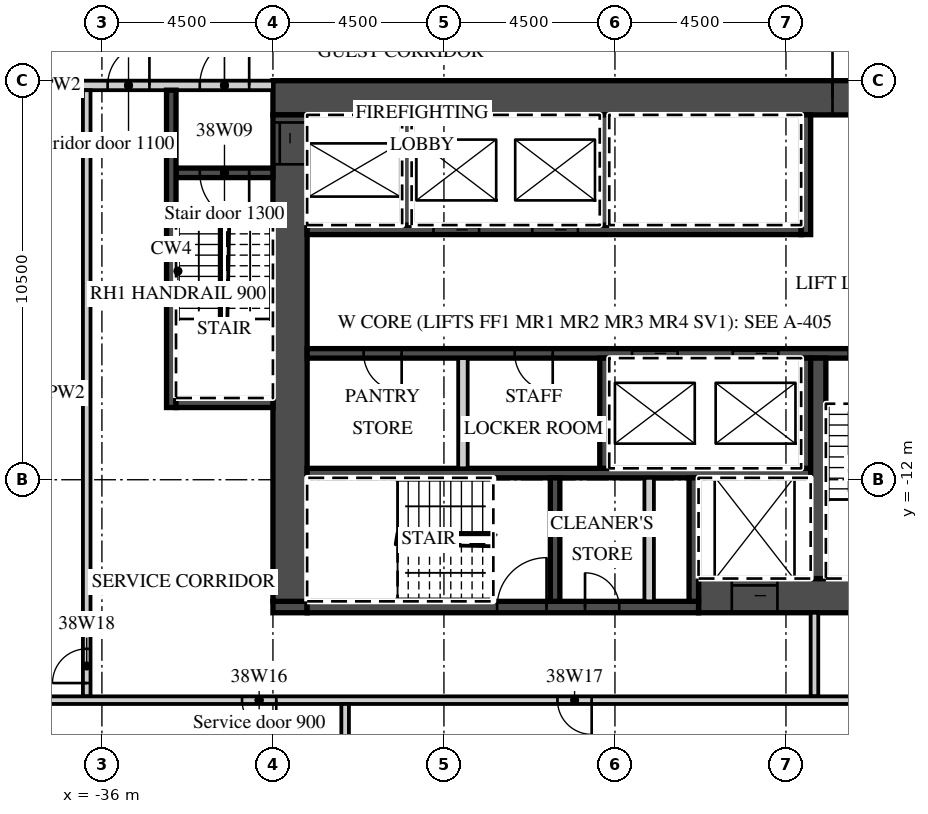
"""IFC4 building model, lengths in metres.
Left out: names, types, materials, properties, quantities, classifications, styles, units other than length and angle.
Written with IfcOpenShell. Run it as: python <this file> out.ifc"""

import sys

from ifc_helpers import new_model, si_unit, direction, frame, frame_2d, origin, place, context, subcontext, project, spatial, rectangle, extrude, element, fill, save


model = new_model("IFC4")
c1 = context("Model", 3, precision=1e-05, world=origin(), true_north=direction((0.0, 1.0)))
c2 = subcontext(c1, "Body", "Model", "MODEL_VIEW")
j1 = project(units=[si_unit("LENGTHUNIT", "METRE"), si_unit("PLANEANGLEUNIT", "RADIAN")], contexts=[c1])
p1 = place(None, origin())
s1 = spatial("IfcSite", under=j1, at=p1, CompositionType="ELEMENT")
p2 = place(p1, origin())
s2 = spatial("IfcBuilding", under=s1, at=p2, CompositionType="ELEMENT")
p3 = place(p2, frame((0.0, 0.0, 166.9)))
s3 = spatial("IfcBuildingStorey", under=s2, at=p3, CompositionType="ELEMENT", Elevation=166.9)
p4 = place(p3, frame((-31.5, -1.95, 0.0), z_axis=(0.0, 0.0, 1.0), x_axis=(1.0, 0.0, 0.0)))
e1 = element("IfcWall", 1, at=p4, inside=s3, PredefinedType="SHEAR", context=c2, shape_type="SweptSolid", body=[
    extrude(rectangle(XDim=18.0, YDim=0.9, at=frame_2d((9.0, 0.0))), origin(), (0.0, 0.0, 1.0), 3.02),
])
p5 = place(p4, frame((14.725, 0.0, 0.0)))
e2 = element("IfcOpeningElement", 2, at=p5, cuts=e1, PredefinedType="OPENING", context=c2, shape_type="SweptSolid", body=[
    extrude(rectangle(XDim=1.8, YDim=2.1, at=frame_2d((0.9, 1.05))), frame((0.0, 0.46, 0.0), z_axis=(0.0, -1.0, 0.0), x_axis=(1.0, 0.0, 0.0)), (0.0, 0.0, 1.0), 0.92),
])
p6 = place(p3, frame((-20.3, -15.05, 0.0), z_axis=(0.0, 0.0, 1.0), x_axis=(1.0, 0.0, 0.0)))
e3 = element("IfcWall", 3, at=p6, inside=s3, PredefinedType="SHEAR", context=c2, shape_type="SweptSolid", body=[
    extrude(rectangle(XDim=6.8, YDim=0.9, at=frame_2d((3.4, 0.0))), origin(), (0.0, 0.0, 1.0), 3.02),
])
p7 = place(p6, frame((0.875, 0.0, 0.0)))
e4 = element("IfcOpeningElement", 4, at=p7, cuts=e3, PredefinedType="OPENING", context=c2, shape_type="SweptSolid", body=[
    extrude(rectangle(XDim=1.2, YDim=2.1, at=frame_2d((0.6, 1.05))), frame((0.0, 0.46, 0.0), z_axis=(0.0, -1.0, 0.0), x_axis=(1.0, 0.0, 0.0)), (0.0, 0.0, 1.0), 0.92),
])
p8 = place(p3, frame((-31.5, -15.35, 0.0), z_axis=(0.0, 0.0, 1.0), x_axis=(1.0, 0.0, 0.0)))
e5 = element("IfcWall", 5, at=p8, inside=s3, PredefinedType="SHEAR", context=c2, shape_type="SweptSolid", body=[
    extrude(rectangle(XDim=0.9, YDim=0.3, at=frame_2d((0.45, 0.0))), origin(), (0.0, 0.0, 1.0), 3.02),
])
p9 = place(p3, frame((-30.6, -15.35, 0.0), z_axis=(0.0, 0.0, 1.0), x_axis=(1.0, 0.0, 0.0)))
e6 = element("IfcWall", 6, at=p9, inside=s3, PredefinedType="SHEAR", context=c2, shape_type="SweptSolid", body=[
    extrude(rectangle(XDim=10.3, YDim=0.3, at=frame_2d((5.15, 0.0))), origin(), (0.0, 0.0, 1.0), 3.02),
])
p10 = place(p9, frame((5.0, 0.0, 0.0)))
e7 = element("IfcOpeningElement", 7, at=p10, cuts=e6, PredefinedType="OPENING", context=c2, shape_type="SweptSolid", body=[
    extrude(rectangle(XDim=1.3, YDim=2.1, at=frame_2d((0.65, 1.05))), frame((0.0, 0.16, 0.0), z_axis=(0.0, -1.0, 0.0), x_axis=(1.0, 0.0, 0.0)), (0.0, 0.0, 1.0), 0.32),
])
p11 = place(p9, frame((7.312, 0.0, 0.0)))
e8 = element("IfcOpeningElement", 8, at=p11, cuts=e6, PredefinedType="OPENING", context=c2, shape_type="SweptSolid", body=[
    extrude(rectangle(XDim=0.9, YDim=2.1, at=frame_2d((0.45, 1.05))), frame((0.0, 0.16, 0.0), z_axis=(0.0, -1.0, 0.0), x_axis=(1.0, 0.0, 0.0)), (0.0, 0.0, 1.0), 0.32),
])
p12 = place(p3, frame((-31.05, -15.2, 0.0), z_axis=(0.0, 0.0, 1.0), x_axis=(0.0, 1.0, 0.0)))
e9 = element("IfcWall", 9, at=p12, inside=s3, PredefinedType="SHEAR", context=c2, shape_type="SweptSolid", body=[
    extrude(rectangle(XDim=12.8, YDim=0.9, at=frame_2d((6.4, 0.0))), origin(), (0.0, 0.0, 1.0), 3.02),
])
p13 = place(p12, frame((11.5, 0.0, 0.0)))
e10 = element("IfcOpeningElement", 10, at=p13, cuts=e9, PredefinedType="OPENING", context=c2, shape_type="SweptSolid", body=[
    extrude(rectangle(XDim=1.1, YDim=2.1, at=frame_2d((0.55, 1.05))), frame((0.0, 0.46, 0.0), z_axis=(0.0, -1.0, 0.0), x_axis=(1.0, 0.0, 0.0)), (0.0, 0.0, 1.0), 0.92),
])
p14 = place(p3, frame((-30.6, -5.425, 0.0), z_axis=(0.0, 0.0, 1.0), x_axis=(1.0, 0.0, 0.0)))
e11 = element("IfcWall", 11, at=p14, inside=s3, PredefinedType="SHEAR", context=c2, shape_type="SweptSolid", body=[
    extrude(rectangle(XDim=13.0, YDim=0.25, at=frame_2d((6.5, 0.0))), origin(), (0.0, 0.0, 1.0), 3.02),
])
p15 = place(p14, frame((3.325, 0.0, 0.0)))
e12 = element("IfcOpeningElement", 12, at=p15, cuts=e11, PredefinedType="OPENING", context=c2, shape_type="SweptSolid", body=[
    extrude(rectangle(XDim=1.2, YDim=2.1, at=frame_2d((0.6, 1.05))), frame((0.0, 0.135, 0.0), z_axis=(0.0, -1.0, 0.0), x_axis=(1.0, 0.0, 0.0)), (0.0, 0.0, 1.0), 0.27),
])
p16 = place(p14, frame((5.925, 0.0, 0.0)))
e13 = element("IfcOpeningElement", 13, at=p16, cuts=e11, PredefinedType="OPENING", context=c2, shape_type="SweptSolid", body=[
    extrude(rectangle(XDim=1.2, YDim=2.1, at=frame_2d((0.6, 1.05))), frame((0.0, 0.135, 0.0), z_axis=(0.0, -1.0, 0.0), x_axis=(1.0, 0.0, 0.0)), (0.0, 0.0, 1.0), 0.27),
])
p17 = place(p3, frame((-17.475, -5.55, 0.0), z_axis=(0.0, 0.0, 1.0), x_axis=(0.0, 1.0, 0.0)))
e14 = element("IfcWall", 14, at=p17, inside=s3, PredefinedType="SHEAR", context=c2, shape_type="SweptSolid", body=[
    extrude(rectangle(XDim=3.15, YDim=0.25, at=frame_2d((1.575, 0.0))), origin(), (0.0, 0.0, 1.0), 3.02),
])
for number, where, z_axis, x_axis in (
    (15, (-27.975, -5.3, 0.0), (0.0, 0.0, 1.0), (0.0, 1.0, 0.0)),
    (16, (-22.775, -5.3, 0.0), (0.0, 0.0, 1.0), (0.0, 1.0, 0.0)),
):
    element("IfcWall", number, at=place(p3, frame(where, z_axis=z_axis, x_axis=x_axis)), inside=s3, PredefinedType="SHEAR", context=c2, shape_type="SweptSolid", body=[
        extrude(rectangle(XDim=2.9, YDim=0.25, at=frame_2d((1.45, 0.0))), origin(), (0.0, 0.0, 1.0), 3.02),
    ])
p18 = place(p3, frame((-30.6, -8.675, 0.0), z_axis=(0.0, 0.0, 1.0), x_axis=(1.0, 0.0, 0.0)))
e17 = element("IfcWall", 17, at=p18, inside=s3, PredefinedType="SHEAR", context=c2, shape_type="SweptSolid", body=[
    extrude(rectangle(XDim=16.2, YDim=0.25, at=frame_2d((8.1, 0.0))), origin(), (0.0, 0.0, 1.0), 3.02),
])
p19 = place(p18, frame((8.55, 0.0, 0.0)))
e18 = element("IfcOpeningElement", 18, at=p19, cuts=e17, PredefinedType="OPENING", context=c2, shape_type="SweptSolid", body=[
    extrude(rectangle(XDim=1.2, YDim=2.1, at=frame_2d((0.6, 1.05))), frame((0.0, 0.135, 0.0), z_axis=(0.0, -1.0, 0.0), x_axis=(1.0, 0.0, 0.0)), (0.0, 0.0, 1.0), 0.27),
])
p20 = place(p18, frame((11.2, 0.0, 0.0)))
e19 = element("IfcOpeningElement", 19, at=p20, cuts=e17, PredefinedType="OPENING", context=c2, shape_type="SweptSolid", body=[
    extrude(rectangle(XDim=1.2, YDim=2.1, at=frame_2d((0.6, 1.05))), frame((0.0, 0.135, 0.0), z_axis=(0.0, -1.0, 0.0), x_axis=(1.0, 0.0, 0.0)), (0.0, 0.0, 1.0), 0.27),
])
p21 = place(p18, frame((14.25, 0.0, 0.0)))
e20 = element("IfcOpeningElement", 20, at=p21, cuts=e17, PredefinedType="OPENING", context=c2, shape_type="SweptSolid", body=[
    extrude(rectangle(XDim=1.3, YDim=2.1, at=frame_2d((0.65, 1.05))), frame((0.0, 0.135, 0.0), z_axis=(0.0, -1.0, 0.0), x_axis=(1.0, 0.0, 0.0)), (0.0, 0.0, 1.0), 0.27),
])
p22 = place(p18, frame((1.488, 0.0, 0.0)))
e21 = element("IfcOpeningElement", 21, at=p22, cuts=e17, PredefinedType="OPENING", context=c2, shape_type="SweptSolid", body=[
    extrude(rectangle(XDim=1.0, YDim=2.1, at=frame_2d((0.5, 1.05))), frame((0.0, 0.135, 0.0), z_axis=(0.0, -1.0, 0.0), x_axis=(1.0, 0.0, 0.0)), (0.0, 0.0, 1.0), 0.27),
])
p23 = place(p18, frame((5.462, 0.0, 0.0)))
e22 = element("IfcOpeningElement", 22, at=p23, cuts=e17, PredefinedType="OPENING", context=c2, shape_type="SweptSolid", body=[
    extrude(rectangle(XDim=1.0, YDim=2.1, at=frame_2d((0.5, 1.05))), frame((0.0, 0.135, 0.0), z_axis=(0.0, -1.0, 0.0), x_axis=(1.0, 0.0, 0.0)), (0.0, 0.0, 1.0), 0.27),
])
p24 = place(p3, frame((-30.6, -11.825, 0.0), z_axis=(0.0, 0.0, 1.0), x_axis=(1.0, 0.0, 0.0)))
e23 = element("IfcWall", 23, at=p24, inside=s3, PredefinedType="SHEAR", context=c2, shape_type="SweptSolid", body=[
    extrude(rectangle(XDim=13.25, YDim=0.25, at=frame_2d((6.625, 0.0))), origin(), (0.0, 0.0, 1.0), 3.02),
])
for number, where, z_axis, x_axis in (
    (24, (-17.475, -11.7, 0.0), (0.0, 0.0, 1.0), (0.0, 1.0, 0.0)),
    (25, (-22.775, -11.7, 0.0), (0.0, 0.0, 1.0), (0.0, 1.0, 0.0)),
):
    element("IfcWall", number, at=place(p3, frame(where, z_axis=z_axis, x_axis=x_axis)), inside=s3, PredefinedType="SHEAR", context=c2, shape_type="SweptSolid", body=[
        extrude(rectangle(XDim=2.9, YDim=0.25, at=frame_2d((1.45, 0.0))), origin(), (0.0, 0.0, 1.0), 3.02),
    ])
p25 = place(p3, frame((-26.5, -11.7, 0.0), z_axis=(0.0, 0.0, 1.0), x_axis=(0.0, 1.0, 0.0)))
e26 = element("IfcWall", 26, at=p25, inside=s3, PredefinedType="PARTITIONING", context=c2, shape_type="SweptSolid", body=[
    extrude(rectangle(XDim=2.9, YDim=0.25, at=frame_2d((1.45, 0.0))), origin(), (0.0, 0.0, 1.0), 3.02),
])
p26 = place(p3, frame((-17.15, -14.6, 0.0), z_axis=(0.0, 0.0, 1.0), x_axis=(0.0, 1.0, 0.0)))
e27 = element("IfcWall", 27, at=p26, inside=s3, PredefinedType="SHEAR", context=c2, shape_type="SweptSolid", body=[
    extrude(rectangle(XDim=5.8, YDim=0.4, at=frame_2d((2.9, 0.0))), origin(), (0.0, 0.0, 1.0), 3.02),
])
for number, where, z_axis, x_axis in (
    (28, (-20.425, -15.2, 0.0), (0.0, 0.0, 1.0), (0.0, 1.0, 0.0)),
    (29, (-24.075, -15.2, 0.0), (0.0, 0.0, 1.0), (0.0, 1.0, 0.0)),
):
    element("IfcWall", number, at=place(p3, frame(where, z_axis=z_axis, x_axis=x_axis)), inside=s3, PredefinedType="SHEAR", context=c2, shape_type="SweptSolid", body=[
        extrude(rectangle(XDim=3.25, YDim=0.25, at=frame_2d((1.625, 0.0))), origin(), (0.0, 0.0, 1.0), 3.02),
    ])
p27 = place(p3, frame((-21.6, -15.2, 0.0), z_axis=(0.0, 0.0, 1.0), x_axis=(0.0, 1.0, 0.0)))
e30 = element("IfcWall", 30, at=p27, inside=s3, PredefinedType="PARTITIONING", context=c2, shape_type="SweptSolid", body=[
    extrude(rectangle(XDim=3.25, YDim=0.25, at=frame_2d((1.625, 0.0))), origin(), (0.0, 0.0, 1.0), 3.02),
])
p28 = place(p3, frame((-42.632, -1.625, 0.0), z_axis=(0.0, 0.0, 1.0), x_axis=(1.0, 0.0, 0.0)))
e31 = element("IfcWall", 31, at=p28, inside=s3, PredefinedType="PARTITIONING", context=c2, shape_type="SweptSolid", body=[
    extrude(rectangle(XDim=11.132, YDim=0.25, at=frame_2d((5.566, 0.0))), origin(), (0.0, 0.0, 1.0), 3.02),
])
p29 = place(p28, frame((9.207, 0.0, 0.0)))
e32 = element("IfcOpeningElement", 32, at=p29, cuts=e31, PredefinedType="OPENING", context=c2, shape_type="SweptSolid", body=[
    extrude(rectangle(XDim=1.3, YDim=2.1, at=frame_2d((0.65, 1.05))), frame((0.0, 0.135, 0.0), z_axis=(0.0, -1.0, 0.0), x_axis=(1.0, 0.0, 0.0)), (0.0, 0.0, 1.0), 0.27),
])
p30 = place(p28, frame((6.781, 0.0, 0.0)))
e33 = element("IfcOpeningElement", 33, at=p30, cuts=e31, PredefinedType="OPENING", context=c2, shape_type="SweptSolid", body=[
    extrude(rectangle(XDim=1.1, YDim=2.1, at=frame_2d((0.55, 1.05))), frame((0.0, 0.135, 0.0), z_axis=(0.0, -1.0, 0.0), x_axis=(1.0, 0.0, 0.0)), (0.0, 0.0, 1.0), 0.27),
])
p31 = place(p3, frame((-34.05, -3.925, 0.0), z_axis=(0.0, 0.0, 1.0), x_axis=(1.0, 0.0, 0.0)))
e34 = element("IfcWall", 34, at=p31, inside=s3, PredefinedType="SHEAR", context=c2, shape_type="SweptSolid", body=[
    extrude(rectangle(XDim=2.55, YDim=0.25, at=frame_2d((1.275, 0.0))), origin(), (0.0, 0.0, 1.0), 3.02),
])
p32 = place(p31, frame((0.625, 0.0, 0.0)))
e35 = element("IfcOpeningElement", 35, at=p32, cuts=e34, PredefinedType="OPENING", context=c2, shape_type="SweptSolid", body=[
    extrude(rectangle(XDim=1.3, YDim=2.1, at=frame_2d((0.65, 1.05))), frame((0.0, 0.135, 0.0), z_axis=(0.0, -1.0, 0.0), x_axis=(1.0, 0.0, 0.0)), (0.0, 0.0, 1.0), 0.27),
])
p33 = place(p3, frame((-34.175, -10.1, 0.0), z_axis=(0.0, 0.0, 1.0), x_axis=(0.0, 1.0, 0.0)))
e36 = element("IfcWall", 36, at=p33, inside=s3, PredefinedType="SHEAR", context=c2, shape_type="SweptSolid", body=[
    extrude(rectangle(XDim=8.35, YDim=0.25, at=frame_2d((4.175, 0.0))), origin(), (0.0, 0.0, 1.0), 3.02),
])
p34 = place(p3, frame((-34.05, -9.975, 0.0), z_axis=(0.0, 0.0, 1.0), x_axis=(1.0, 0.0, 0.0)))
e37 = element("IfcWall", 37, at=p34, inside=s3, PredefinedType="SHEAR", context=c2, shape_type="SweptSolid", body=[
    extrude(rectangle(XDim=2.55, YDim=0.25, at=frame_2d((1.275, 0.0))), origin(), (0.0, 0.0, 1.0), 3.02),
])
p35 = place(p3, frame((-17.25, -17.7, 0.0), z_axis=(0.0, 0.0, 1.0), x_axis=(0.0, 1.0, 0.0)))
e38 = element("IfcWall", 38, at=p35, inside=s3, PredefinedType="PARTITIONING", context=c2, shape_type="SweptSolid", body=[
    extrude(rectangle(XDim=2.2, YDim=0.2, at=frame_2d((1.1, 0.0))), origin(), (0.0, 0.0, 1.0), 3.02),
])
p36 = place(p3, frame((-36.4, -17.7, 0.0), z_axis=(0.0, 0.0, 1.0), x_axis=(0.0, 1.0, 0.0)))
e39 = element("IfcWall", 39, at=p36, inside=s3, PredefinedType="PARTITIONING", context=c2, shape_type="SweptSolid", body=[
    extrude(rectangle(XDim=15.95, YDim=0.2, at=frame_2d((7.975, 0.0))), origin(), (0.0, 0.0, 1.0), 3.02),
])
p37 = place(p36, frame((0.35, 0.0, 0.0)))
e40 = element("IfcOpeningElement", 40, at=p37, cuts=e39, PredefinedType="OPENING", context=c2, shape_type="SweptSolid", body=[
    extrude(rectangle(XDim=0.9, YDim=2.1, at=frame_2d((0.45, 1.05))), frame((0.0, 0.11, 0.0), z_axis=(0.0, -1.0, 0.0), x_axis=(1.0, 0.0, 0.0)), (0.0, 0.0, 1.0), 0.22),
])
p38 = place(p3, frame((-41.074, -17.8, 0.0), z_axis=(0.0, 0.0, 1.0), x_axis=(1.0, 0.0, 0.0)))
e41 = element("IfcWall", 41, at=p38, inside=s3, PredefinedType="PARTITIONING", context=c2, shape_type="SweptSolid", body=[
    extrude(rectangle(XDim=27.474, YDim=0.2, at=frame_2d((13.737, 0.0))), origin(), (0.0, 0.0, 1.0), 3.02),
])
p39 = place(p38, frame((8.762, 0.0, 0.0)))
e42 = element("IfcOpeningElement", 42, at=p39, cuts=e41, PredefinedType="OPENING", context=c2, shape_type="SweptSolid", body=[
    extrude(rectangle(XDim=0.9, YDim=2.1, at=frame_2d((0.45, 1.05))), frame((0.0, 0.11, 0.0), z_axis=(0.0, -1.0, 0.0), x_axis=(1.0, 0.0, 0.0)), (0.0, 0.0, 1.0), 0.22),
])
p40 = place(p38, frame((17.062, 0.0, 0.0)))
e43 = element("IfcOpeningElement", 43, at=p40, cuts=e41, PredefinedType="OPENING", context=c2, shape_type="SweptSolid", body=[
    extrude(rectangle(XDim=0.9, YDim=2.1, at=frame_2d((0.45, 1.05))), frame((0.0, 0.11, 0.0), z_axis=(0.0, -1.0, 0.0), x_axis=(1.0, 0.0, 0.0)), (0.0, 0.0, 1.0), 0.22),
])
p41 = place(p3, frame((-29.6, -23.852, 0.0), z_axis=(0.0, 0.0, 1.0), x_axis=(0.0, 1.0, 0.0)))
e44 = element("IfcWall", 44, at=p41, inside=s3, PredefinedType="PARTITIONING", context=c2, shape_type="SweptSolid", body=[
    extrude(rectangle(XDim=5.952, YDim=0.2, at=frame_2d((2.976, 0.0))), origin(), (0.0, 0.0, 1.0), 3.02),
])
p42 = place(p19, origin())
e45 = element("IfcDoor", 45, at=p42, inside=s3, OperationType="SLIDING_TO_LEFT", PredefinedType="DOOR", context=c2, shape_type="SweptSolid", body=[
    extrude(rectangle(XDim=1.2, YDim=2.1, at=frame_2d((0.6, 1.05))), frame((0.0, 0.025, 0.0), z_axis=(0.0, -1.0, 0.0), x_axis=(1.0, 0.0, 0.0)), (0.0, 0.0, 1.0), 0.05),
])
fill(e18, e45)
p43 = place(p20, origin())
e46 = element("IfcDoor", 46, at=p43, inside=s3, OperationType="SLIDING_TO_RIGHT", PredefinedType="DOOR", context=c2, shape_type="SweptSolid", body=[
    extrude(rectangle(XDim=1.2, YDim=2.1, at=frame_2d((0.6, 1.05))), frame((0.0, 0.025, 0.0), z_axis=(0.0, -1.0, 0.0), x_axis=(1.0, 0.0, 0.0)), (0.0, 0.0, 1.0), 0.05),
])
fill(e19, e46)
p44 = place(p15, origin())
e47 = element("IfcDoor", 47, at=p44, inside=s3, OperationType="SLIDING_TO_RIGHT", PredefinedType="DOOR", context=c2, shape_type="SweptSolid", body=[
    extrude(rectangle(XDim=1.2, YDim=2.1, at=frame_2d((0.6, 1.05))), frame((0.0, 0.025, 0.0), z_axis=(0.0, -1.0, 0.0), x_axis=(1.0, 0.0, 0.0)), (0.0, 0.0, 1.0), 0.05),
])
fill(e12, e47)
p45 = place(p16, origin())
e48 = element("IfcDoor", 48, at=p45, inside=s3, OperationType="SLIDING_TO_RIGHT", PredefinedType="DOOR", context=c2, shape_type="SweptSolid", body=[
    extrude(rectangle(XDim=1.2, YDim=2.1, at=frame_2d((0.6, 1.05))), frame((0.0, 0.025, 0.0), z_axis=(0.0, -1.0, 0.0), x_axis=(1.0, 0.0, 0.0)), (0.0, 0.0, 1.0), 0.05),
])
fill(e13, e48)
p46 = place(p7, origin())
e49 = element("IfcDoor", 49, at=p46, inside=s3, OperationType="SLIDING_TO_LEFT", PredefinedType="DOOR", context=c2, shape_type="SweptSolid", body=[
    extrude(rectangle(XDim=1.2, YDim=2.1, at=frame_2d((0.6, 1.05))), frame((0.0, 0.025, 0.0), z_axis=(0.0, -1.0, 0.0), x_axis=(1.0, 0.0, 0.0)), (0.0, 0.0, 1.0), 0.05),
])
fill(e4, e49)
p47 = place(p13, origin())
e50 = element("IfcDoor", 50, at=p47, inside=s3, OperationType="SLIDING_TO_RIGHT", PredefinedType="DOOR", context=c2, shape_type="SweptSolid", body=[
    extrude(rectangle(XDim=1.1, YDim=2.1, at=frame_2d((0.55, 1.05))), frame((0.0, 0.025, 0.0), z_axis=(0.0, -1.0, 0.0), x_axis=(1.0, 0.0, 0.0)), (0.0, 0.0, 1.0), 0.05),
])
fill(e10, e50)
p48 = place(p5, origin())
e51 = element("IfcDoor", 51, at=p48, inside=s3, OperationType="DOUBLE_DOOR_DOUBLE_SWING", PredefinedType="DOOR", context=c2, shape_type="SweptSolid", body=[
    extrude(rectangle(XDim=1.8, YDim=2.1, at=frame_2d((0.9, 1.05))), frame((0.0, 0.025, 0.0), z_axis=(0.0, -1.0, 0.0), x_axis=(1.0, 0.0, 0.0)), (0.0, 0.0, 1.0), 0.05),
])
fill(e2, e51)
p49 = place(p29, origin())
e52 = element("IfcDoor", 52, at=p49, inside=s3, OperationType="SINGLE_SWING_RIGHT", PredefinedType="DOOR", context=c2, shape_type="SweptSolid", body=[
    extrude(rectangle(XDim=1.3, YDim=2.1, at=frame_2d((0.65, 1.05))), frame((0.0, 0.025, 0.0), z_axis=(0.0, -1.0, 0.0), x_axis=(1.0, 0.0, 0.0)), (0.0, 0.0, 1.0), 0.05),
])
fill(e32, e52)
p50 = place(p32, origin())
e53 = element("IfcDoor", 53, at=p50, inside=s3, OperationType="SINGLE_SWING_RIGHT", PredefinedType="DOOR", context=c2, shape_type="SweptSolid", body=[
    extrude(rectangle(XDim=1.3, YDim=2.1, at=frame_2d((0.65, 1.05))), frame((0.0, 0.025, 0.0), z_axis=(0.0, -1.0, 0.0), x_axis=(1.0, 0.0, 0.0)), (0.0, 0.0, 1.0), 0.05),
])
fill(e35, e53)
p51 = place(p30, origin())
e54 = element("IfcDoor", 54, at=p51, inside=s3, OperationType="SINGLE_SWING_RIGHT", PredefinedType="DOOR", context=c2, shape_type="SweptSolid", body=[
    extrude(rectangle(XDim=1.1, YDim=2.1, at=frame_2d((0.55, 1.05))), frame((0.0, 0.025, 0.0), z_axis=(0.0, -1.0, 0.0), x_axis=(1.0, 0.0, 0.0)), (0.0, 0.0, 1.0), 0.05),
])
fill(e33, e54)
p52 = place(p21, origin())
e55 = element("IfcDoor", 55, at=p52, inside=s3, OperationType="SINGLE_SWING_RIGHT", PredefinedType="DOOR", context=c2, shape_type="SweptSolid", body=[
    extrude(rectangle(XDim=1.3, YDim=2.1, at=frame_2d((0.65, 1.05))), frame((0.0, 0.025, 0.0), z_axis=(0.0, -1.0, 0.0), x_axis=(1.0, 0.0, 0.0)), (0.0, 0.0, 1.0), 0.05),
])
fill(e20, e55)
p53 = place(p10, origin())
e56 = element("IfcDoor", 56, at=p53, inside=s3, OperationType="SINGLE_SWING_RIGHT", PredefinedType="DOOR", context=c2, shape_type="SweptSolid", body=[
    extrude(rectangle(XDim=1.3, YDim=2.1, at=frame_2d((0.65, 1.05))), frame((0.0, 0.025, 0.0), z_axis=(0.0, -1.0, 0.0), x_axis=(1.0, 0.0, 0.0)), (0.0, 0.0, 1.0), 0.05),
])
fill(e7, e56)
p54 = place(p11, origin())
e57 = element("IfcDoor", 57, at=p54, inside=s3, OperationType="SINGLE_SWING_LEFT", PredefinedType="DOOR", context=c2, shape_type="SweptSolid", body=[
    extrude(rectangle(XDim=0.9, YDim=2.1, at=frame_2d((0.45, 1.05))), frame((0.0, 0.025, 0.0), z_axis=(0.0, -1.0, 0.0), x_axis=(1.0, 0.0, 0.0)), (0.0, 0.0, 1.0), 0.05),
])
fill(e8, e57)
p55 = place(p22, origin())
e58 = element("IfcDoor", 58, at=p55, inside=s3, OperationType="SINGLE_SWING_RIGHT", PredefinedType="DOOR", context=c2, shape_type="SweptSolid", body=[
    extrude(rectangle(XDim=1.0, YDim=2.1, at=frame_2d((0.5, 1.05))), frame((0.0, 0.025, 0.0), z_axis=(0.0, -1.0, 0.0), x_axis=(1.0, 0.0, 0.0)), (0.0, 0.0, 1.0), 0.05),
])
fill(e21, e58)
p56 = place(p23, origin())
e59 = element("IfcDoor", 59, at=p56, inside=s3, OperationType="SINGLE_SWING_RIGHT", PredefinedType="DOOR", context=c2, shape_type="SweptSolid", body=[
    extrude(rectangle(XDim=1.0, YDim=2.1, at=frame_2d((0.5, 1.05))), frame((0.0, 0.025, 0.0), z_axis=(0.0, -1.0, 0.0), x_axis=(1.0, 0.0, 0.0)), (0.0, 0.0, 1.0), 0.05),
])
fill(e22, e59)
p57 = place(p39, origin())
e60 = element("IfcDoor", 60, at=p57, inside=s3, OperationType="SINGLE_SWING_RIGHT", PredefinedType="DOOR", context=c2, shape_type="SweptSolid", body=[
    extrude(rectangle(XDim=0.9, YDim=2.1, at=frame_2d((0.45, 1.05))), frame((0.0, 0.025, 0.0), z_axis=(0.0, -1.0, 0.0), x_axis=(1.0, 0.0, 0.0)), (0.0, 0.0, 1.0), 0.05),
])
fill(e42, e60)
p58 = place(p40, origin())
e61 = element("IfcDoor", 61, at=p58, inside=s3, OperationType="SINGLE_SWING_RIGHT", PredefinedType="DOOR", context=c2, shape_type="SweptSolid", body=[
    extrude(rectangle(XDim=0.9, YDim=2.1, at=frame_2d((0.45, 1.05))), frame((0.0, 0.025, 0.0), z_axis=(0.0, -1.0, 0.0), x_axis=(1.0, 0.0, 0.0)), (0.0, 0.0, 1.0), 0.05),
])
fill(e43, e61)
p59 = place(p37, origin())
e62 = element("IfcDoor", 62, at=p59, inside=s3, OperationType="SINGLE_SWING_LEFT", PredefinedType="DOOR", context=c2, shape_type="SweptSolid", body=[
    extrude(rectangle(XDim=0.9, YDim=2.1, at=frame_2d((0.45, 1.05))), frame((0.0, 0.025, 0.0), z_axis=(0.0, -1.0, 0.0), x_axis=(1.0, 0.0, 0.0)), (0.0, 0.0, 1.0), 0.05),
])
fill(e40, e62)
save(model, sys.argv[1])
